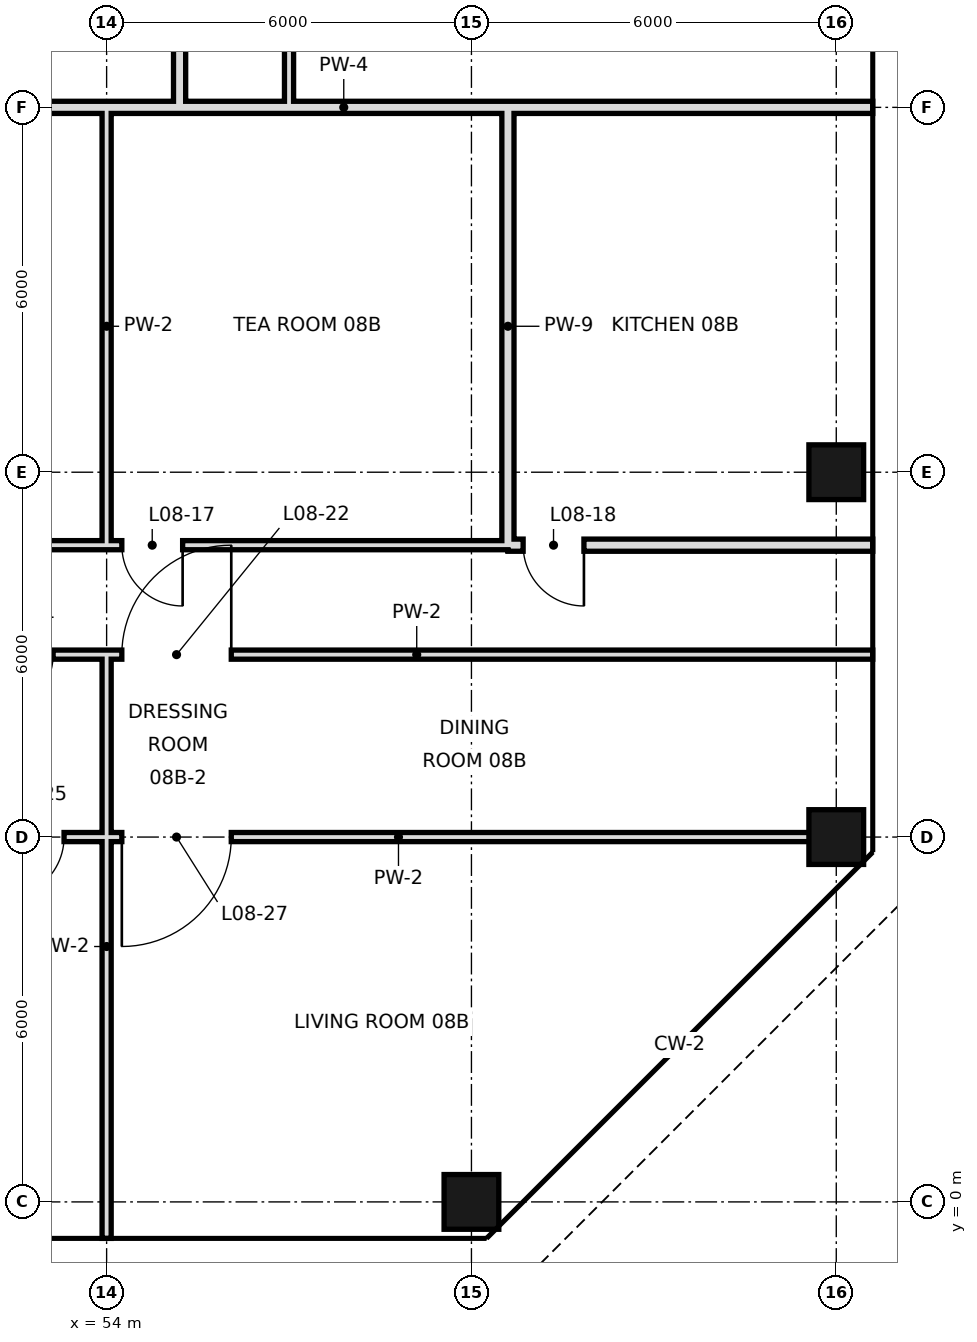
"""IFC4 building model, lengths in metres.
Left out: names, types, materials, properties, quantities, classifications, styles, units other than length and angle.
Written with IfcOpenShell. Run it as: python <this file> out.ifc"""

import sys

from ifc_helpers import new_model, si_unit, direction, frame, frame_2d, origin, origin_2d, place, context, subcontext, project, spatial, rectangle, hollow_rectangle, extrude, element, fill, save


model = new_model("IFC4")
c1 = context("Model", 3, precision=1e-05, world=origin(), true_north=direction((0.0, 1.0)))
c2 = subcontext(c1, "Body", "Model", "MODEL_VIEW")
j1 = project(units=[si_unit("LENGTHUNIT", "METRE"), si_unit("PLANEANGLEUNIT", "RADIAN")], contexts=[c1])
p1 = place(None, origin())
s1 = spatial("IfcSite", under=j1, at=p1, CompositionType="ELEMENT")
p2 = place(p1, origin())
s2 = spatial("IfcBuilding", under=s1, at=p2, CompositionType="ELEMENT")
p3 = place(p2, frame((0.0, 0.0, 49.8)))
s3 = spatial("IfcBuildingStorey", under=s2, at=p3, CompositionType="ELEMENT", Elevation=49.8)
for number, where, z_axis, x_axis in (
    (1, (60.0, 0.0, 0.0), (0.0, 0.0, 1.0), (1.0, 0.0, 0.0)),
    (2, (66.0, 6.0, 0.0), (0.0, 0.0, 1.0), (1.0, 0.0, 0.0)),
    (3, (66.0, 12.0, 0.0), (0.0, 0.0, 1.0), (1.0, 0.0, 0.0)),
):
    element("IfcColumn", number, at=place(p3, frame(where, z_axis=z_axis, x_axis=x_axis)), inside=s3, PredefinedType="COLUMN", context=c2, shape_type="SweptSolid", body=[
        extrude(hollow_rectangle(XDim=0.9, YDim=0.9, WallThickness=0.045, at=origin_2d()), origin(), (0.0, 0.0, 1.0), 3.6),
    ])
p4 = place(p3, frame((54.0, -0.6, 0.0), z_axis=(0.0, 0.0, 1.0), x_axis=(0.0, 1.0, 0.0)))
e4 = element("IfcWall", 4, at=p4, inside=s3, PredefinedType="PARTITIONING", context=c2, shape_type="SweptSolid", body=[
    extrude(rectangle(XDim=9.6, YDim=0.15, at=frame_2d((4.8, 0.0))), origin(), (0.0, 0.0, 1.0), 3.42),
])
p5 = place(p3, frame((54.0, 10.8, 0.0), z_axis=(0.0, 0.0, 1.0), x_axis=(0.0, 1.0, 0.0)))
e5 = element("IfcWall", 5, at=p5, inside=s3, PredefinedType="PARTITIONING", context=c2, shape_type="SweptSolid", body=[
    extrude(rectangle(XDim=7.2, YDim=0.15, at=frame_2d((3.6, 0.0))), origin(), (0.0, 0.0, 1.0), 3.42),
])
p6 = place(p3, frame((55.2, 18.0, 0.0), z_axis=(0.0, 0.0, 1.0), x_axis=(0.0, 1.0, 0.0)))
e6 = element("IfcWall", 6, at=p6, inside=s3, PredefinedType="SOLIDWALL", context=c2, shape_type="SweptSolid", body=[
    extrude(rectangle(XDim=3.6, YDim=0.2, at=frame_2d((1.8, 0.0))), origin(), (0.0, 0.0, 1.0), 2.52),
])
p7 = place(p6, frame((1.3, 0.0, 0.0)))
e7 = element("IfcOpeningElement", 7, at=p7, cuts=e6, PredefinedType="OPENING", context=c2, shape_type="SweptSolid", body=[
    extrude(rectangle(XDim=1.0, YDim=2.4, at=frame_2d((0.5, 1.2))), frame((0.0, 0.11, 0.0), z_axis=(0.0, -1.0, 0.0), x_axis=(1.0, 0.0, 0.0)), (0.0, 0.0, 1.0), 0.22),
])
p8 = place(p3, frame((57.0, 18.0, 0.0), z_axis=(0.0, 0.0, 1.0), x_axis=(0.0, 1.0, 0.0)))
e8 = element("IfcWall", 8, at=p8, inside=s3, PredefinedType="PARTITIONING", context=c2, shape_type="SweptSolid", body=[
    extrude(rectangle(XDim=6.0, YDim=0.15, at=frame_2d((3.0, 0.0))), origin(), (0.0, 0.0, 1.0), 3.42),
])
p9 = place(p8, frame((3.4, 0.0, 0.0)))
e9 = element("IfcOpeningElement", 9, at=p9, cuts=e8, PredefinedType="OPENING", context=c2, shape_type="SweptSolid", body=[
    extrude(rectangle(XDim=1.0, YDim=2.4, at=frame_2d((0.5, 1.2))), frame((0.0, 0.085, 0.0), z_axis=(0.0, -1.0, 0.0), x_axis=(1.0, 0.0, 0.0)), (0.0, 0.0, 1.0), 0.17),
])
p10 = place(p3, frame((60.6, 10.8, 0.0), z_axis=(0.0, 0.0, 1.0), x_axis=(0.0, 1.0, 0.0)))
e10 = element("IfcWall", 10, at=p10, inside=s3, PredefinedType="SOLIDWALL", context=c2, shape_type="SweptSolid", body=[
    extrude(rectangle(XDim=7.2, YDim=0.2, at=frame_2d((3.6, 0.0))), origin(), (0.0, 0.0, 1.0), 2.52),
])
p11 = place(p3, frame((60.6, 10.8, 0.0), z_axis=(0.0, 0.0, 1.0), x_axis=(1.0, 0.0, 0.0)))
e11 = element("IfcWall", 11, at=p11, inside=s3, PredefinedType="SOLIDWALL", context=c2, shape_type="SweptSolid", body=[
    extrude(rectangle(XDim=6.0, YDim=0.2, at=frame_2d((3.0, 0.0))), origin(), (0.0, 0.0, 1.0), 2.97),
])
p12 = place(p11, frame((0.25, 0.0, 0.0)))
e12 = element("IfcOpeningElement", 12, at=p12, cuts=e11, PredefinedType="OPENING", context=c2, shape_type="SweptSolid", body=[
    extrude(rectangle(XDim=1.0, YDim=2.4, at=frame_2d((0.5, 1.2))), frame((0.0, 0.11, 0.0), z_axis=(0.0, -1.0, 0.0), x_axis=(1.0, 0.0, 0.0)), (0.0, 0.0, 1.0), 0.22),
])
p13 = place(p3, frame((38.4, 10.8, 0.0), z_axis=(0.0, 0.0, 1.0), x_axis=(1.0, 0.0, 0.0)))
e13 = element("IfcWall", 13, at=p13, inside=s3, PredefinedType="PARTITIONING", context=c2, shape_type="SweptSolid", body=[
    extrude(rectangle(XDim=22.2, YDim=0.15, at=frame_2d((11.1, 0.0))), origin(), (0.0, 0.0, 1.0), 3.42),
])
p14 = place(p13, frame((3.4, 0.0, 0.0)))
e14 = element("IfcOpeningElement", 14, at=p14, cuts=e13, PredefinedType="OPENING", context=c2, shape_type="SweptSolid", body=[
    extrude(rectangle(XDim=1.0, YDim=2.4, at=frame_2d((0.5, 1.2))), frame((0.0, 0.085, 0.0), z_axis=(0.0, -1.0, 0.0), x_axis=(1.0, 0.0, 0.0)), (0.0, 0.0, 1.0), 0.17),
])
p15 = place(p13, frame((10.3, 0.0, 0.0)))
e15 = element("IfcOpeningElement", 15, at=p15, cuts=e13, PredefinedType="OPENING", context=c2, shape_type="SweptSolid", body=[
    extrude(rectangle(XDim=1.0, YDim=2.4, at=frame_2d((0.5, 1.2))), frame((0.0, 0.085, 0.0), z_axis=(0.0, -1.0, 0.0), x_axis=(1.0, 0.0, 0.0)), (0.0, 0.0, 1.0), 0.17),
])
p16 = place(p13, frame((15.85, 0.0, 0.0)))
e16 = element("IfcOpeningElement", 16, at=p16, cuts=e13, PredefinedType="OPENING", context=c2, shape_type="SweptSolid", body=[
    extrude(rectangle(XDim=1.0, YDim=2.4, at=frame_2d((0.5, 1.2))), frame((0.0, 0.085, 0.0), z_axis=(0.0, -1.0, 0.0), x_axis=(1.0, 0.0, 0.0)), (0.0, 0.0, 1.0), 0.17),
])
p17 = place(p3, frame((44.9, 18.0, 0.0), z_axis=(0.0, 0.0, 1.0), x_axis=(1.0, 0.0, 0.0)))
e17 = element("IfcWall", 17, at=p17, inside=s3, PredefinedType="SOLIDWALL", context=c2, shape_type="SweptSolid", body=[
    extrude(rectangle(XDim=10.3, YDim=0.2, at=frame_2d((5.15, 0.0))), origin(), (0.0, 0.0, 1.0), 2.52),
])
p18 = place(p3, frame((60.6, 18.0, 0.0), z_axis=(0.0, 0.0, 1.0), x_axis=(1.0, 0.0, 0.0)))
e18 = element("IfcWall", 18, at=p18, inside=s3, PredefinedType="SOLIDWALL", context=c2, shape_type="SweptSolid", body=[
    extrude(rectangle(XDim=6.0, YDim=0.2, at=frame_2d((3.0, 0.0))), origin(), (0.0, 0.0, 1.0), 2.52),
])
p19 = place(p3, frame((55.2, 18.0, 0.0), z_axis=(0.0, 0.0, 1.0), x_axis=(1.0, 0.0, 0.0)))
e19 = element("IfcWall", 19, at=p19, inside=s3, PredefinedType="SOLIDWALL", context=c2, shape_type="SweptSolid", body=[
    extrude(rectangle(XDim=5.4, YDim=0.2, at=frame_2d((2.7, 0.0))), origin(), (0.0, 0.0, 1.0), 2.52),
])
p20 = place(p3, frame((51.6, 6.0, 0.0), z_axis=(0.0, 0.0, 1.0), x_axis=(1.0, 0.0, 0.0)))
e20 = element("IfcWall", 20, at=p20, inside=s3, PredefinedType="PARTITIONING", context=c2, shape_type="SweptSolid", body=[
    extrude(rectangle(XDim=14.4, YDim=0.15, at=frame_2d((7.2, 0.0))), origin(), (0.0, 0.0, 1.0), 2.52),
])
p21 = place(p20, frame((0.7, 0.0, 0.0)))
e21 = element("IfcOpeningElement", 21, at=p21, cuts=e20, PredefinedType="OPENING", context=c2, shape_type="SweptSolid", body=[
    extrude(rectangle(XDim=1.0, YDim=2.4, at=frame_2d((0.5, 1.2))), frame((0.0, 0.085, 0.0), z_axis=(0.0, -1.0, 0.0), x_axis=(1.0, 0.0, 0.0)), (0.0, 0.0, 1.0), 0.17),
])
p22 = place(p20, frame((2.65, 0.0, 0.0)))
e22 = element("IfcOpeningElement", 22, at=p22, cuts=e20, PredefinedType="OPENING", context=c2, shape_type="SweptSolid", body=[
    extrude(rectangle(XDim=1.8, YDim=2.4, at=frame_2d((0.9, 1.2))), frame((0.0, 0.085, 0.0), z_axis=(0.0, -1.0, 0.0), x_axis=(1.0, 0.0, 0.0)), (0.0, 0.0, 1.0), 0.17),
])
p23 = place(p3, frame((51.6, 9.0, 0.0), z_axis=(0.0, 0.0, 1.0), x_axis=(1.0, 0.0, 0.0)))
e23 = element("IfcWall", 23, at=p23, inside=s3, PredefinedType="PARTITIONING", context=c2, shape_type="SweptSolid", body=[
    extrude(rectangle(XDim=15.0, YDim=0.15, at=frame_2d((7.5, 0.0))), origin(), (0.0, 0.0, 1.0), 3.42),
])
p24 = place(p23, frame((0.52, 0.0, 0.0)))
e24 = element("IfcOpeningElement", 24, at=p24, cuts=e23, PredefinedType="OPENING", context=c2, shape_type="SweptSolid", body=[
    extrude(rectangle(XDim=1.0, YDim=2.4, at=frame_2d((0.5, 1.2))), frame((0.0, 0.085, 0.0), z_axis=(0.0, -1.0, 0.0), x_axis=(1.0, 0.0, 0.0)), (0.0, 0.0, 1.0), 0.17),
])
p25 = place(p23, frame((2.65, 0.0, 0.0)))
e25 = element("IfcOpeningElement", 25, at=p25, cuts=e23, PredefinedType="OPENING", context=c2, shape_type="SweptSolid", body=[
    extrude(rectangle(XDim=1.8, YDim=2.4, at=frame_2d((0.9, 1.2))), frame((0.0, 0.085, 0.0), z_axis=(0.0, -1.0, 0.0), x_axis=(1.0, 0.0, 0.0)), (0.0, 0.0, 1.0), 0.17),
])
p26 = place(p16, origin())
e26 = element("IfcDoor", 26, at=p26, inside=s3, OperationType="SINGLE_SWING_RIGHT", PredefinedType="DOOR", context=c2, shape_type="SweptSolid", body=[
    extrude(rectangle(XDim=1.0, YDim=2.4, at=frame_2d((0.5, 1.2))), frame((0.0, 0.025, 0.0), z_axis=(0.0, -1.0, 0.0), x_axis=(1.0, 0.0, 0.0)), (0.0, 0.0, 1.0), 0.05),
])
fill(e16, e26)
p27 = place(p12, origin())
e27 = element("IfcDoor", 27, at=p27, inside=s3, OperationType="SINGLE_SWING_RIGHT", PredefinedType="DOOR", context=c2, shape_type="SweptSolid", body=[
    extrude(rectangle(XDim=1.0, YDim=2.4, at=frame_2d((0.5, 1.2))), frame((0.0, 0.025, 0.0), z_axis=(0.0, -1.0, 0.0), x_axis=(1.0, 0.0, 0.0)), (0.0, 0.0, 1.0), 0.05),
])
fill(e12, e27)
p28 = place(p24, frame((1.0, 0.0, 0.0), z_axis=(0.0, 0.0, 1.0), x_axis=(-1.0, 0.0, 0.0)))
e28 = element("IfcDoor", 28, at=p28, inside=s3, OperationType="SINGLE_SWING_RIGHT", PredefinedType="DOOR", context=c2, shape_type="SweptSolid", body=[
    extrude(rectangle(XDim=1.0, YDim=2.4, at=frame_2d((0.5, 1.2))), frame((0.0, 0.025, 0.0), z_axis=(0.0, -1.0, 0.0), x_axis=(1.0, 0.0, 0.0)), (0.0, 0.0, 1.0), 0.05),
])
fill(e24, e28)
p29 = place(p25, frame((1.8, 0.0, 0.0), z_axis=(0.0, 0.0, 1.0), x_axis=(-1.0, 0.0, 0.0)))
e29 = element("IfcDoor", 29, at=p29, inside=s3, OperationType="SINGLE_SWING_LEFT", PredefinedType="DOOR", context=c2, shape_type="SweptSolid", body=[
    extrude(rectangle(XDim=1.8, YDim=2.4, at=frame_2d((0.9, 1.2))), frame((0.0, 0.025, 0.0), z_axis=(0.0, -1.0, 0.0), x_axis=(1.0, 0.0, 0.0)), (0.0, 0.0, 1.0), 0.05),
])
fill(e25, e29)
p30 = place(p21, frame((1.0, 0.0, 0.0), z_axis=(0.0, 0.0, 1.0), x_axis=(-1.0, 0.0, 0.0)))
e30 = element("IfcDoor", 30, at=p30, inside=s3, OperationType="SINGLE_SWING_RIGHT", PredefinedType="DOOR", context=c2, shape_type="SweptSolid", body=[
    extrude(rectangle(XDim=1.0, YDim=2.4, at=frame_2d((0.5, 1.2))), frame((0.0, 0.025, 0.0), z_axis=(0.0, -1.0, 0.0), x_axis=(1.0, 0.0, 0.0)), (0.0, 0.0, 1.0), 0.05),
])
fill(e21, e30)
p31 = place(p22, frame((1.8, 0.0, 0.0), z_axis=(0.0, 0.0, 1.0), x_axis=(-1.0, 0.0, 0.0)))
e31 = element("IfcDoor", 31, at=p31, inside=s3, OperationType="SINGLE_SWING_RIGHT", PredefinedType="DOOR", context=c2, shape_type="SweptSolid", body=[
    extrude(rectangle(XDim=1.8, YDim=2.4, at=frame_2d((0.9, 1.2))), frame((0.0, 0.025, 0.0), z_axis=(0.0, -1.0, 0.0), x_axis=(1.0, 0.0, 0.0)), (0.0, 0.0, 1.0), 0.05),
])
fill(e22, e31)
save(model, sys.argv[1])
